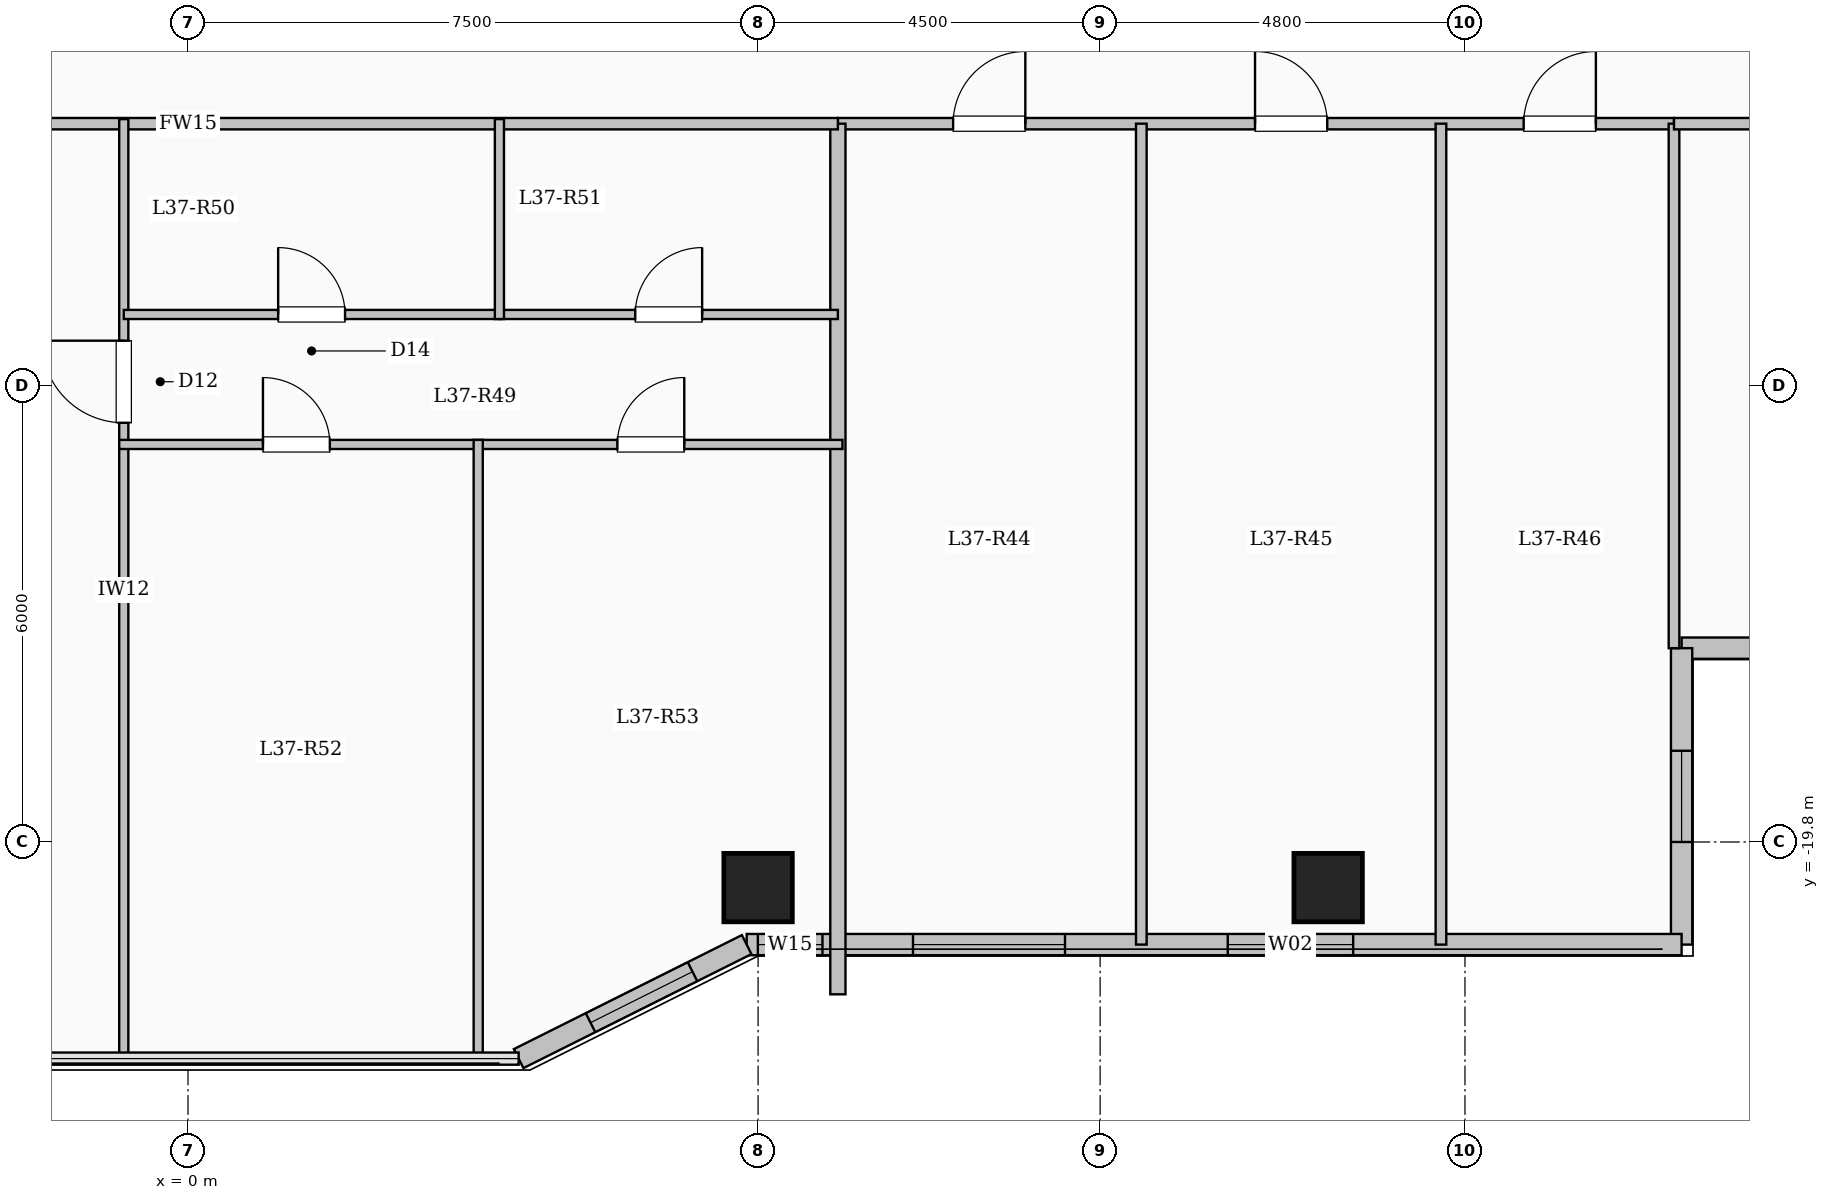
"""IFC4 building model, lengths in metres.
Left out: names, types, materials, properties, quantities, classifications, styles, units other than length and angle.
Written with IfcOpenShell. Run it as: python <this file> out.ifc"""

import sys

from ifc_helpers import new_model, si_unit, direction, frame, frame_2d, origin, origin_2d, place, context, subcontext, project, spatial, rectangle, extrude, element, fill, save


model = new_model("IFC4")
c1 = context("Model", 3, precision=1e-05, world=origin(), true_north=direction((0.0, 1.0)))
c2 = subcontext(c1, "Body", "Model", "MODEL_VIEW")
j1 = project(units=[si_unit("LENGTHUNIT", "METRE"), si_unit("PLANEANGLEUNIT", "RADIAN")], contexts=[c1])
p1 = place(None, origin())
s1 = spatial("IfcSite", under=j1, at=p1, CompositionType="ELEMENT")
p2 = place(p1, origin())
s2 = spatial("IfcBuilding", under=s1, at=p2, CompositionType="ELEMENT")
p3 = place(p2, frame((0.0, 0.0, 139.3)))
s3 = spatial("IfcBuildingStorey", under=s2, at=p3, CompositionType="ELEMENT", Elevation=139.3)
for number, where, z_axis, x_axis in (
    (1, (7.5, -20.4, 0.0), (0.0, 0.0, 1.0), (1.0, 0.0, 0.0)),
    (2, (15.0, -20.4, 0.0), (0.0, 0.0, 1.0), (1.0, 0.0, 0.0)),
):
    element("IfcColumn", number, at=place(p3, frame(where, z_axis=z_axis, x_axis=x_axis)), inside=s3, PredefinedType="COLUMN", context=c2, shape_type="SweptSolid", body=[
        extrude(rectangle(XDim=0.9, YDim=0.9, at=origin_2d()), origin(), (0.0, 0.0, 1.0), 3.35),
    ])
p4 = place(p3, frame((25.05, -17.25, 0.0), z_axis=(0.0, 0.0, 1.0), x_axis=(-1.0, 0.0, 0.0)))
e3 = element("IfcWall", 3, at=p4, inside=s3, PredefinedType="SOLIDWALL", context=c2, shape_type="SweptSolid", body=[
    extrude(rectangle(XDim=5.4, YDim=0.28, at=frame_2d((2.7, 0.0))), origin(), (0.0, 0.0, 1.0), 3.1),
])
p5 = place(p4, frame((1.625, 0.0, 0.9)))
e4 = element("IfcOpeningElement", 4, at=p5, cuts=e3, PredefinedType="OPENING", context=c2, shape_type="SweptSolid", body=[
    extrude(rectangle(XDim=2.2, YDim=1.75, at=frame_2d((1.1, 0.875))), frame((0.0, 0.15, 0.0), z_axis=(0.0, -1.0, 0.0), x_axis=(1.0, 0.0, 0.0)), (0.0, 0.0, 1.0), 0.3),
])
p6 = place(p3, frame((19.65, -17.25, 0.0), z_axis=(0.0, 0.0, 1.0), x_axis=(0.0, -1.0, 0.0)))
e5 = element("IfcWall", 5, at=p6, inside=s3, PredefinedType="SOLIDWALL", context=c2, shape_type="SweptSolid", body=[
    extrude(rectangle(XDim=3.9, YDim=0.28, at=frame_2d((1.95, 0.0))), origin(), (0.0, 0.0, 1.0), 3.1),
])
p7 = place(p6, frame((1.35, 0.0, 0.95)))
e6 = element("IfcOpeningElement", 6, at=p7, cuts=e5, PredefinedType="OPENING", context=c2, shape_type="SweptSolid", body=[
    extrude(rectangle(XDim=1.2, YDim=1.5, at=frame_2d((0.6, 0.75))), frame((0.0, 0.15, 0.0), z_axis=(0.0, -1.0, 0.0), x_axis=(1.0, 0.0, 0.0)), (0.0, 0.0, 1.0), 0.3),
])
p8 = place(p3, frame((19.65, -21.15, 0.0), z_axis=(0.0, 0.0, 1.0), x_axis=(-1.0, 0.0, 0.0)))
e7 = element("IfcWall", 7, at=p8, inside=s3, PredefinedType="SOLIDWALL", context=c2, shape_type="SweptSolid", body=[
    extrude(rectangle(XDim=12.3, YDim=0.28, at=frame_2d((6.15, 0.0))), origin(), (0.0, 0.0, 1.0), 3.1),
])
p9 = place(p8, frame((4.321, 0.0, 0.9)))
e8 = element("IfcOpeningElement", 8, at=p9, cuts=e7, PredefinedType="OPENING", context=c2, shape_type="SweptSolid", body=[
    extrude(rectangle(XDim=1.65, YDim=1.6, at=frame_2d((0.825, 0.8))), frame((0.0, 0.15, 0.0), z_axis=(0.0, -1.0, 0.0), x_axis=(1.0, 0.0, 0.0)), (0.0, 0.0, 1.0), 0.3),
])
p10 = place(p8, frame((8.112, 0.0, 0.9)))
e9 = element("IfcOpeningElement", 9, at=p10, cuts=e7, PredefinedType="OPENING", context=c2, shape_type="SweptSolid", body=[
    extrude(rectangle(XDim=2.0, YDim=1.7, at=frame_2d((1.0, 0.85))), frame((0.0, 0.15, 0.0), z_axis=(0.0, -1.0, 0.0), x_axis=(1.0, 0.0, 0.0)), (0.0, 0.0, 1.0), 0.3),
])
p11 = place(p8, frame((11.303, 0.0, 0.95)))
e10 = element("IfcOpeningElement", 10, at=p11, cuts=e7, PredefinedType="OPENING", context=c2, shape_type="SweptSolid", body=[
    extrude(rectangle(XDim=0.85, YDim=1.5, at=frame_2d((0.425, 0.75))), frame((0.0, 0.15, 0.0), z_axis=(0.0, -1.0, 0.0), x_axis=(1.0, 0.0, 0.0)), (0.0, 0.0, 1.0), 0.3),
])
p12 = place(p3, frame((7.35, -21.15, 0.0), z_axis=(0.0, 0.0, 1.0), x_axis=(-0.894427191, -0.4472135955, 0.0)))
e11 = element("IfcWall", 11, at=p12, inside=s3, PredefinedType="SOLIDWALL", context=c2, shape_type="SweptSolid", body=[
    extrude(rectangle(XDim=3.354, YDim=0.28, at=frame_2d((1.677, 0.0))), origin(), (0.0, 0.0, 1.0), 3.1),
])
p13 = place(p12, frame((0.797, 0.0, 0.9)))
e12 = element("IfcOpeningElement", 12, at=p13, cuts=e11, PredefinedType="OPENING", context=c2, shape_type="SweptSolid", body=[
    extrude(rectangle(XDim=1.5, YDim=1.65, at=frame_2d((0.75, 0.825))), frame((0.0, 0.15, 0.0), z_axis=(0.0, -1.0, 0.0), x_axis=(1.0, 0.0, 0.0)), (0.0, 0.0, 1.0), 0.3),
])
p14 = place(p3, frame((8.55, -10.35, 0.0), z_axis=(0.0, 0.0, 1.0), x_axis=(1.0, 0.0, 0.0)))
e13 = element("IfcWall", 13, at=p14, inside=s3, PredefinedType="PARTITIONING", context=c2, shape_type="SweptSolid", body=[
    extrude(rectangle(XDim=11.0, YDim=0.15, at=frame_2d((5.5, 0.0))), origin(), (0.0, 0.0, 1.0), 3.1),
])
p15 = place(p14, frame((1.516, 0.0, 0.0)))
e14 = element("IfcOpeningElement", 14, at=p15, cuts=e13, PredefinedType="OPENING", context=c2, shape_type="SweptSolid", body=[
    extrude(rectangle(XDim=0.95, YDim=2.15, at=frame_2d((0.475, 1.075))), frame((0.0, 0.085, 0.0), z_axis=(0.0, -1.0, 0.0), x_axis=(1.0, 0.0, 0.0)), (0.0, 0.0, 1.0), 0.17),
])
p16 = place(p14, frame((5.488, 0.0, 0.0)))
e15 = element("IfcOpeningElement", 15, at=p16, cuts=e13, PredefinedType="OPENING", context=c2, shape_type="SweptSolid", body=[
    extrude(rectangle(XDim=0.95, YDim=2.15, at=frame_2d((0.475, 1.075))), frame((0.0, 0.085, 0.0), z_axis=(0.0, -1.0, 0.0), x_axis=(1.0, 0.0, 0.0)), (0.0, 0.0, 1.0), 0.17),
])
p17 = place(p14, frame((9.022, 0.0, 0.0)))
e16 = element("IfcOpeningElement", 16, at=p17, cuts=e13, PredefinedType="OPENING", context=c2, shape_type="SweptSolid", body=[
    extrude(rectangle(XDim=0.95, YDim=2.15, at=frame_2d((0.475, 1.075))), frame((0.0, 0.085, 0.0), z_axis=(0.0, -1.0, 0.0), x_axis=(1.0, 0.0, 0.0)), (0.0, 0.0, 1.0), 0.17),
])
for number, where, z_axis, x_axis in (
    (17, (12.542, -21.15, 0.0), (0.0, 0.0, 1.0), (0.0, 1.0, 0.0)),
    (18, (16.484, -21.15, 0.0), (0.0, 0.0, 1.0), (0.0, 1.0, 0.0)),
):
    element("IfcWall", number, at=place(p3, frame(where, z_axis=z_axis, x_axis=x_axis)), inside=s3, PredefinedType="PARTITIONING", context=c2, shape_type="SweptSolid", body=[
        extrude(rectangle(XDim=10.8, YDim=0.14, at=frame_2d((5.4, 0.0))), origin(), (0.0, 0.0, 1.0), 3.1),
    ])
p18 = place(p3, frame((8.55, -21.804, 0.0), z_axis=(0.0, 0.0, 1.0), x_axis=(0.0, 1.0, 0.0)))
e19 = element("IfcWall", 19, at=p18, inside=s3, PredefinedType="SOLIDWALL", context=c2, shape_type="SweptSolid", body=[
    extrude(rectangle(XDim=11.454, YDim=0.2, at=frame_2d((5.727, 0.0))), origin(), (0.0, 0.0, 1.0), 3.1),
])
p19 = place(p3, frame((-8.55, -10.35, 0.0), z_axis=(0.0, 0.0, 1.0), x_axis=(1.0, 0.0, 0.0)))
e20 = element("IfcWall", 20, at=p19, inside=s3, PredefinedType="PARTITIONING", context=c2, shape_type="SweptSolid", body=[
    extrude(rectangle(XDim=17.1, YDim=0.15, at=frame_2d((8.55, 0.0))), origin(), (0.0, 0.0, 1.0), 3.1),
])
p20 = place(p19, frame((1.6, 0.0, 0.0)))
e21 = element("IfcOpeningElement", 21, at=p20, cuts=e20, PredefinedType="OPENING", context=c2, shape_type="SweptSolid", body=[
    extrude(rectangle(XDim=0.96, YDim=2.15, at=frame_2d((0.48, 1.075))), frame((0.0, 0.085, 0.0), z_axis=(0.0, -1.0, 0.0), x_axis=(1.0, 0.0, 0.0)), (0.0, 0.0, 1.0), 0.17),
])
p21 = place(p3, frame((-0.845, -22.68, 0.0), z_axis=(0.0, 0.0, 1.0), x_axis=(0.0, 1.0, 0.0)))
e22 = element("IfcWall", 22, at=p21, inside=s3, PredefinedType="PARTITIONING", context=c2, shape_type="SweptSolid", body=[
    extrude(rectangle(XDim=12.39, YDim=0.12, at=frame_2d((6.195, 0.0))), origin(), (0.0, 0.0, 1.0), 3.1),
])
p22 = place(p21, frame((8.395, 0.0, 0.0)))
e23 = element("IfcOpeningElement", 23, at=p22, cuts=e22, PredefinedType="OPENING", context=c2, shape_type="SweptSolid", body=[
    extrude(rectangle(XDim=1.08, YDim=2.15, at=frame_2d((0.54, 1.075))), frame((0.0, 0.07, 0.0), z_axis=(0.0, -1.0, 0.0), x_axis=(1.0, 0.0, 0.0)), (0.0, 0.0, 1.0), 0.14),
])
p23 = place(p3, frame((-0.845, -12.86, 0.0), z_axis=(0.0, 0.0, 1.0), x_axis=(1.0, 0.0, 0.0)))
e24 = element("IfcWall", 24, at=p23, inside=s3, PredefinedType="PARTITIONING", context=c2, shape_type="SweptSolid", body=[
    extrude(rectangle(XDim=4.942, YDim=0.12, at=frame_2d((2.471, 0.0))), origin(), (0.0, 0.0, 1.0), 3.1),
])
p24 = place(p23, frame((2.031, 0.0, 0.0)))
e25 = element("IfcOpeningElement", 25, at=p24, cuts=e24, PredefinedType="OPENING", context=c2, shape_type="SweptSolid", body=[
    extrude(rectangle(XDim=0.88, YDim=2.1, at=frame_2d((0.44, 1.05))), frame((0.0, 0.07, 0.0), z_axis=(0.0, -1.0, 0.0), x_axis=(1.0, 0.0, 0.0)), (0.0, 0.0, 1.0), 0.14),
])
p25 = place(p3, frame((4.097, -12.86, 0.0), z_axis=(0.0, 0.0, 1.0), x_axis=(1.0, 0.0, 0.0)))
e26 = element("IfcWall", 26, at=p25, inside=s3, PredefinedType="PARTITIONING", context=c2, shape_type="SweptSolid", body=[
    extrude(rectangle(XDim=4.453, YDim=0.12, at=frame_2d((2.227, 0.0))), origin(), (0.0, 0.0, 1.0), 3.1),
])
p26 = place(p25, frame((1.787, 0.0, 0.0)))
e27 = element("IfcOpeningElement", 27, at=p26, cuts=e26, PredefinedType="OPENING", context=c2, shape_type="SweptSolid", body=[
    extrude(rectangle(XDim=0.88, YDim=2.1, at=frame_2d((0.44, 1.05))), frame((0.0, 0.07, 0.0), z_axis=(0.0, -1.0, 0.0), x_axis=(1.0, 0.0, 0.0)), (0.0, 0.0, 1.0), 0.14),
])
p27 = place(p3, frame((-0.905, -14.57, 0.0), z_axis=(0.0, 0.0, 1.0), x_axis=(1.0, 0.0, 0.0)))
e28 = element("IfcWall", 28, at=p27, inside=s3, PredefinedType="PARTITIONING", context=c2, shape_type="SweptSolid", body=[
    extrude(rectangle(XDim=9.515, YDim=0.12, at=frame_2d((4.758, 0.0))), origin(), (0.0, 0.0, 1.0), 3.1),
])
p28 = place(p27, frame((1.891, 0.0, 0.0)))
e29 = element("IfcOpeningElement", 29, at=p28, cuts=e28, PredefinedType="OPENING", context=c2, shape_type="SweptSolid", body=[
    extrude(rectangle(XDim=0.88, YDim=2.1, at=frame_2d((0.44, 1.05))), frame((0.0, 0.07, 0.0), z_axis=(0.0, -1.0, 0.0), x_axis=(1.0, 0.0, 0.0)), (0.0, 0.0, 1.0), 0.14),
])
p29 = place(p27, frame((6.554, 0.0, 0.0)))
e30 = element("IfcOpeningElement", 30, at=p29, cuts=e28, PredefinedType="OPENING", context=c2, shape_type="SweptSolid", body=[
    extrude(rectangle(XDim=0.88, YDim=2.1, at=frame_2d((0.44, 1.05))), frame((0.0, 0.07, 0.0), z_axis=(0.0, -1.0, 0.0), x_axis=(1.0, 0.0, 0.0)), (0.0, 0.0, 1.0), 0.14),
])
p30 = place(p3, frame((4.097, -12.92, 0.0), z_axis=(0.0, 0.0, 1.0), x_axis=(0.0, 1.0, 0.0)))
e31 = element("IfcWall", 31, at=p30, inside=s3, PredefinedType="PARTITIONING", context=c2, shape_type="SweptSolid", body=[
    extrude(rectangle(XDim=2.63, YDim=0.12, at=frame_2d((1.315, 0.0))), origin(), (0.0, 0.0, 1.0), 3.1),
])
p31 = place(p3, frame((3.818, -22.68, 0.0), z_axis=(0.0, 0.0, 1.0), x_axis=(0.0, 1.0, 0.0)))
e32 = element("IfcWall", 32, at=p31, inside=s3, PredefinedType="PARTITIONING", context=c2, shape_type="SweptSolid", body=[
    extrude(rectangle(XDim=8.17, YDim=0.12, at=frame_2d((4.085, 0.0))), origin(), (0.0, 0.0, 1.0), 3.1),
])
p32 = place(p3, frame((19.55, -17.25, 0.0), z_axis=(0.0, 0.0, 1.0), x_axis=(0.0, 1.0, 0.0)))
e33 = element("IfcWall", 33, at=p32, inside=s3, PredefinedType="PARTITIONING", context=c2, shape_type="SweptSolid", body=[
    extrude(rectangle(XDim=6.9, YDim=0.14, at=frame_2d((3.45, 0.0))), origin(), (0.0, 0.0, 1.0), 3.1),
])
p33 = place(p3, frame((19.55, -10.35, 0.0), z_axis=(0.0, 0.0, 1.0), x_axis=(1.0, 0.0, 0.0)))
e34 = element("IfcWall", 34, at=p33, inside=s3, PredefinedType="PARTITIONING", context=c2, shape_type="SweptSolid", body=[
    extrude(rectangle(XDim=5.53, YDim=0.15, at=frame_2d((2.765, 0.0))), origin(), (0.0, 0.0, 1.0), 3.1),
])
p34 = place(p33, frame((2.29, 0.0, 0.0)))
e35 = element("IfcOpeningElement", 35, at=p34, cuts=e34, PredefinedType="OPENING", context=c2, shape_type="SweptSolid", body=[
    extrude(rectangle(XDim=0.95, YDim=2.15, at=frame_2d((0.475, 1.075))), frame((0.0, 0.085, 0.0), z_axis=(0.0, -1.0, 0.0), x_axis=(1.0, 0.0, 0.0)), (0.0, 0.0, 1.0), 0.17),
])
p35 = place(p7, origin())
e36 = element("IfcWindow", 36, at=p35, inside=s3, PartitioningType="SINGLE_PANEL", PredefinedType="WINDOW", context=c2, shape_type="SweptSolid", body=[
    extrude(rectangle(XDim=1.2, YDim=1.5, at=frame_2d((0.6, 0.75))), frame((0.0, 0.03, 0.0), z_axis=(0.0, -1.0, 0.0), x_axis=(1.0, 0.0, 0.0)), (0.0, 0.0, 1.0), 0.06),
])
fill(e6, e36)
p36 = place(p9, origin())
e37 = element("IfcWindow", 37, at=p36, inside=s3, PartitioningType="SINGLE_PANEL", PredefinedType="WINDOW", context=c2, shape_type="SweptSolid", body=[
    extrude(rectangle(XDim=1.65, YDim=1.6, at=frame_2d((0.825, 0.8))), frame((0.0, 0.03, 0.0), z_axis=(0.0, -1.0, 0.0), x_axis=(1.0, 0.0, 0.0)), (0.0, 0.0, 1.0), 0.06),
])
fill(e8, e37)
p37 = place(p10, origin())
e38 = element("IfcWindow", 38, at=p37, inside=s3, PartitioningType="SINGLE_PANEL", PredefinedType="WINDOW", context=c2, shape_type="SweptSolid", body=[
    extrude(rectangle(XDim=2.0, YDim=1.7, at=frame_2d((1.0, 0.85))), frame((0.0, 0.03, 0.0), z_axis=(0.0, -1.0, 0.0), x_axis=(1.0, 0.0, 0.0)), (0.0, 0.0, 1.0), 0.06),
])
fill(e9, e38)
p38 = place(p11, origin())
e39 = element("IfcWindow", 39, at=p38, inside=s3, PartitioningType="SINGLE_PANEL", PredefinedType="WINDOW", context=c2, shape_type="SweptSolid", body=[
    extrude(rectangle(XDim=0.85, YDim=1.5, at=frame_2d((0.425, 0.75))), frame((0.0, 0.03, 0.0), z_axis=(0.0, -1.0, 0.0), x_axis=(1.0, 0.0, 0.0)), (0.0, 0.0, 1.0), 0.06),
])
fill(e10, e39)
p39 = place(p13, origin())
e40 = element("IfcWindow", 40, at=p39, inside=s3, PartitioningType="SINGLE_PANEL", PredefinedType="WINDOW", context=c2, shape_type="SweptSolid", body=[
    extrude(rectangle(XDim=1.5, YDim=1.65, at=frame_2d((0.75, 0.825))), frame((0.0, 0.03, 0.0), z_axis=(0.0, -1.0, 0.0), x_axis=(1.0, 0.0, 0.0)), (0.0, 0.0, 1.0), 0.06),
])
fill(e12, e40)
p40 = place(p15, origin())
e41 = element("IfcDoor", 41, at=p40, inside=s3, OperationType="SINGLE_SWING_RIGHT", PredefinedType="DOOR", context=c2, shape_type="SweptSolid", body=[
    extrude(rectangle(XDim=0.95, YDim=2.15, at=frame_2d((0.475, 1.075))), frame((0.0, 0.025, 0.0), z_axis=(0.0, -1.0, 0.0), x_axis=(1.0, 0.0, 0.0)), (0.0, 0.0, 1.0), 0.05),
])
fill(e14, e41)
p41 = place(p16, origin())
e42 = element("IfcDoor", 42, at=p41, inside=s3, OperationType="SINGLE_SWING_LEFT", PredefinedType="DOOR", context=c2, shape_type="SweptSolid", body=[
    extrude(rectangle(XDim=0.95, YDim=2.15, at=frame_2d((0.475, 1.075))), frame((0.0, 0.025, 0.0), z_axis=(0.0, -1.0, 0.0), x_axis=(1.0, 0.0, 0.0)), (0.0, 0.0, 1.0), 0.05),
])
fill(e15, e42)
p42 = place(p17, origin())
e43 = element("IfcDoor", 43, at=p42, inside=s3, OperationType="SINGLE_SWING_RIGHT", PredefinedType="DOOR", context=c2, shape_type="SweptSolid", body=[
    extrude(rectangle(XDim=0.95, YDim=2.15, at=frame_2d((0.475, 1.075))), frame((0.0, 0.025, 0.0), z_axis=(0.0, -1.0, 0.0), x_axis=(1.0, 0.0, 0.0)), (0.0, 0.0, 1.0), 0.05),
])
fill(e16, e43)
p43 = place(p22, origin())
e44 = element("IfcDoor", 44, at=p43, inside=s3, OperationType="SINGLE_SWING_RIGHT", PredefinedType="DOOR", context=c2, shape_type="SweptSolid", body=[
    extrude(rectangle(XDim=1.08, YDim=2.15, at=frame_2d((0.54, 1.075))), frame((0.0, 0.025, 0.0), z_axis=(0.0, -1.0, 0.0), x_axis=(1.0, 0.0, 0.0)), (0.0, 0.0, 1.0), 0.05),
])
fill(e23, e44)
p44 = place(p24, origin())
e45 = element("IfcDoor", 45, at=p44, inside=s3, OperationType="SINGLE_SWING_LEFT", PredefinedType="DOOR", context=c2, shape_type="SweptSolid", body=[
    extrude(rectangle(XDim=0.88, YDim=2.1, at=frame_2d((0.44, 1.05))), frame((0.0, 0.025, 0.0), z_axis=(0.0, -1.0, 0.0), x_axis=(1.0, 0.0, 0.0)), (0.0, 0.0, 1.0), 0.05),
])
fill(e25, e45)
p45 = place(p26, origin())
e46 = element("IfcDoor", 46, at=p45, inside=s3, OperationType="SINGLE_SWING_RIGHT", PredefinedType="DOOR", context=c2, shape_type="SweptSolid", body=[
    extrude(rectangle(XDim=0.88, YDim=2.1, at=frame_2d((0.44, 1.05))), frame((0.0, 0.025, 0.0), z_axis=(0.0, -1.0, 0.0), x_axis=(1.0, 0.0, 0.0)), (0.0, 0.0, 1.0), 0.05),
])
fill(e27, e46)
p46 = place(p28, origin())
e47 = element("IfcDoor", 47, at=p46, inside=s3, OperationType="SINGLE_SWING_LEFT", PredefinedType="DOOR", context=c2, shape_type="SweptSolid", body=[
    extrude(rectangle(XDim=0.88, YDim=2.1, at=frame_2d((0.44, 1.05))), frame((0.0, 0.025, 0.0), z_axis=(0.0, -1.0, 0.0), x_axis=(1.0, 0.0, 0.0)), (0.0, 0.0, 1.0), 0.05),
])
fill(e29, e47)
p47 = place(p29, origin())
e48 = element("IfcDoor", 48, at=p47, inside=s3, OperationType="SINGLE_SWING_RIGHT", PredefinedType="DOOR", context=c2, shape_type="SweptSolid", body=[
    extrude(rectangle(XDim=0.88, YDim=2.1, at=frame_2d((0.44, 1.05))), frame((0.0, 0.025, 0.0), z_axis=(0.0, -1.0, 0.0), x_axis=(1.0, 0.0, 0.0)), (0.0, 0.0, 1.0), 0.05),
])
fill(e30, e48)
save(model, sys.argv[1])
